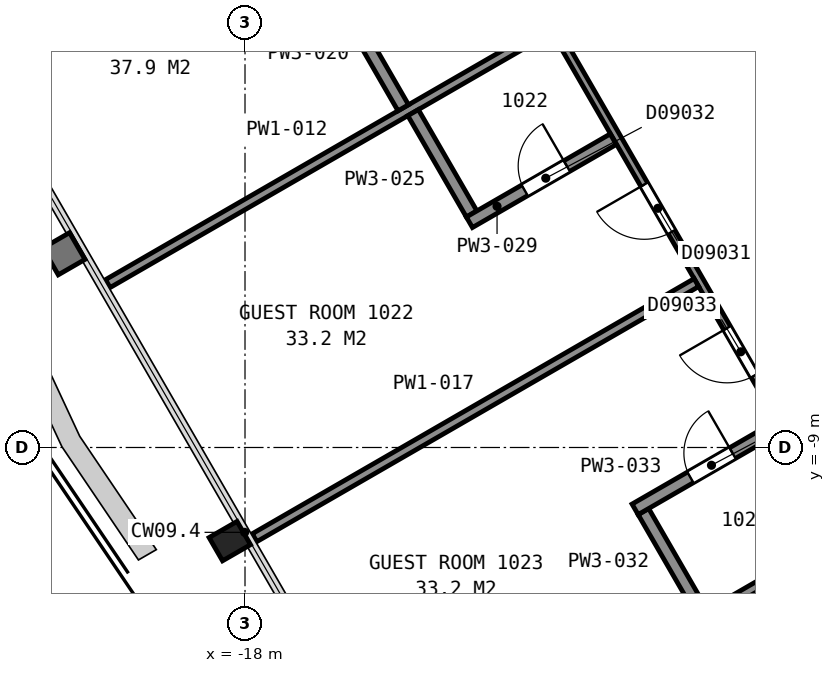
"""IFC4 building model, lengths in metres.
Left out: names, types, materials, properties, quantities, classifications, styles, units other than length and angle.
Written with IfcOpenShell. Run it as: python <this file> out.ifc"""

import sys

from ifc_helpers import new_model, si_unit, direction, frame, frame_2d, origin, origin_2d, place, context, subcontext, project, spatial, rectangle, i_section, extrude, element, fill, save


model = new_model("IFC4")
c1 = context("Model", 3, precision=1e-05, world=origin(), true_north=direction((0.0, 1.0)))
c2 = subcontext(c1, "Body", "Model", "MODEL_VIEW")
j1 = project(units=[si_unit("LENGTHUNIT", "METRE"), si_unit("PLANEANGLEUNIT", "RADIAN")], contexts=[c1])
p1 = place(None, origin())
s1 = spatial("IfcSite", under=j1, at=p1, CompositionType="ELEMENT")
p2 = place(p1, origin())
s2 = spatial("IfcBuilding", under=s1, at=p2, CompositionType="ELEMENT")
p3 = place(p2, frame((0.0, 0.0, 51.2)))
s3 = spatial("IfcBuildingStorey", under=s2, at=p3, CompositionType="ELEMENT", Elevation=51.2)
p4 = place(p3, frame((-18.25, -10.54, 0.0), z_axis=(0.0, 0.0, 1.0), x_axis=(-0.5, 0.866025403784, 0.0)))
e1 = element("IfcColumn", 1, at=p4, inside=s3, PredefinedType="COLUMN", context=c2, shape_type="SweptSolid", body=[
    extrude(i_section(OverallWidth=0.442, OverallDepth=0.531, WebThickness=0.066, FlangeThickness=0.106, FilletRadius=0.015, at=origin_2d()), origin(), (0.0, 0.0, 1.0), 3.6),
])
p5 = place(p3, frame((-13.664, 5.946, 0.0), z_axis=(0.0, 0.0, 1.0), x_axis=(0.499994327219, -0.866028678941, 0.0)))
e2 = element("IfcWall", 2, at=p5, inside=s3, PredefinedType="PARTITIONING", context=c2, shape_type="SweptSolid", body=[
    extrude(rectangle(XDim=23.968, YDim=0.2, at=frame_2d((11.984, 0.0))), origin(), (0.0, 0.0, 1.0), 3.35),
])
p6 = place(p3, frame((-20.256, -6.305, 0.0), z_axis=(0.0, 0.0, 1.0), x_axis=(0.866037818403, 0.499978496633, 0.0)))
e3 = element("IfcWall", 3, at=p6, inside=s3, PredefinedType="PARTITIONING", context=c2, shape_type="SweptSolid", body=[
    extrude(rectangle(XDim=8.391, YDim=0.15, at=frame_2d((4.196, 0.0))), origin(), (0.0, 0.0, 1.0), 2.613),
])
p7 = place(p3, frame((-3.766, -17.959, 0.0), z_axis=(0.0, 0.0, 1.0), x_axis=(-0.500002884005, 0.866023738697, 0.0)))
e4 = element("IfcWall", 4, at=p7, inside=s3, PredefinedType="PARTITIONING", context=c2, shape_type="SweptSolid", body=[
    extrude(rectangle(XDim=28.135, YDim=0.125, at=frame_2d((14.067, 0.0))), origin(), (0.0, 0.0, 1.0), 2.613),
])
p8 = place(p7, frame((25.422, 0.0, 0.0)))
e5 = element("IfcOpeningElement", 5, at=p8, cuts=e4, PredefinedType="OPENING", context=c2, shape_type="SweptSolid", body=[
    extrude(rectangle(XDim=1.0, YDim=2.1, at=frame_2d((0.5, 1.05))), frame((0.0, 0.073, 0.0), z_axis=(0.0, -1.0, 0.0), x_axis=(1.0, 0.0, 0.0)), (0.0, 0.0, 1.0), 0.145),
])
p9 = place(p7, frame((21.693, 0.0, 0.0)))
e6 = element("IfcOpeningElement", 6, at=p9, cuts=e4, PredefinedType="OPENING", context=c2, shape_type="SweptSolid", body=[
    extrude(rectangle(XDim=0.9, YDim=2.1, at=frame_2d((0.45, 1.05))), frame((0.0, 0.073, 0.0), z_axis=(0.0, -1.0, 0.0), x_axis=(1.0, 0.0, 0.0)), (0.0, 0.0, 1.0), 0.145),
])
p10 = place(p7, frame((14.438, 0.0, 0.0)))
e7 = element("IfcOpeningElement", 7, at=p10, cuts=e4, PredefinedType="OPENING", context=c2, shape_type="SweptSolid", body=[
    extrude(rectangle(XDim=0.9, YDim=2.1, at=frame_2d((0.45, 1.05))), frame((0.0, 0.073, 0.0), z_axis=(0.0, -1.0, 0.0), x_axis=(1.0, 0.0, 0.0)), (0.0, 0.0, 1.0), 0.145),
])
p11 = place(p7, frame((11.712, 0.0, 0.0)))
e8 = element("IfcOpeningElement", 8, at=p11, cuts=e4, PredefinedType="OPENING", context=c2, shape_type="SweptSolid", body=[
    extrude(rectangle(XDim=0.9, YDim=2.1, at=frame_2d((0.45, 1.05))), frame((0.0, 0.073, 0.0), z_axis=(0.0, -1.0, 0.0), x_axis=(1.0, 0.0, 0.0)), (0.0, 0.0, 1.0), 0.145),
])
p12 = place(p7, frame((4.787, 0.0, 0.0)))
e9 = element("IfcOpeningElement", 9, at=p12, cuts=e4, PredefinedType="OPENING", context=c2, shape_type="SweptSolid", body=[
    extrude(rectangle(XDim=0.9, YDim=2.1, at=frame_2d((0.45, 1.05))), frame((0.0, 0.073, 0.0), z_axis=(0.0, -1.0, 0.0), x_axis=(1.0, 0.0, 0.0)), (0.0, 0.0, 1.0), 0.145),
])
p13 = place(p7, frame((1.762, 0.0, 0.0)))
e10 = element("IfcOpeningElement", 10, at=p13, cuts=e4, PredefinedType="OPENING", context=c2, shape_type="SweptSolid", body=[
    extrude(rectangle(XDim=0.9, YDim=2.1, at=frame_2d((0.45, 1.05))), frame((0.0, 0.073, 0.0), z_axis=(0.0, -1.0, 0.0), x_axis=(1.0, 0.0, 0.0)), (0.0, 0.0, 1.0), 0.145),
])
p14 = place(p3, frame((-17.844, -10.484, 0.0), z_axis=(0.0, 0.0, 1.0), x_axis=(0.866037818403, 0.499978496633, 0.0)))
e11 = element("IfcWall", 11, at=p14, inside=s3, PredefinedType="PARTITIONING", context=c2, shape_type="SweptSolid", body=[
    extrude(rectangle(XDim=8.391, YDim=0.15, at=frame_2d((4.196, 0.0))), origin(), (0.0, 0.0, 1.0), 2.613),
])
p15 = place(p3, frame((-16.41, -1.659, 0.0), z_axis=(0.0, 0.0, 1.0), x_axis=(0.49983374806, -0.866121368112, 0.0)))
e12 = element("IfcWall", 12, at=p15, inside=s3, PredefinedType="PARTITIONING", context=c2, shape_type="SweptSolid", body=[
    extrude(rectangle(XDim=2.026, YDim=0.2, at=frame_2d((1.013, 0.0))), origin(), (0.0, 0.0, 1.0), 2.613),
])
p16 = place(p3, frame((-15.431, -14.663, 0.0), z_axis=(0.0, 0.0, 1.0), x_axis=(0.866027553047, 0.499996277349, 0.0)))
e13 = element("IfcWall", 13, at=p16, inside=s3, PredefinedType="PARTITIONING", context=c2, shape_type="SweptSolid", body=[
    extrude(rectangle(XDim=8.387, YDim=0.15, at=frame_2d((4.193, 0.0))), origin(), (0.0, 0.0, 1.0), 2.613),
])
p17 = place(p3, frame((-15.236, -3.493, 0.0), z_axis=(0.0, 0.0, 1.0), x_axis=(0.500190942922, -0.865915134767, 0.0)))
e14 = element("IfcWall", 14, at=p17, inside=s3, PredefinedType="PARTITIONING", context=c2, shape_type="SweptSolid", body=[
    extrude(rectangle(XDim=1.925, YDim=0.2, at=frame_2d((0.962, 0.0))), origin(), (0.0, 0.0, 1.0), 2.613),
])
p18 = place(p3, frame((-14.31, -5.296, 0.0), z_axis=(0.0, 0.0, 1.0), x_axis=(0.866012976267, 0.500021524473, 0.0)))
e15 = element("IfcWall", 15, at=p18, inside=s3, PredefinedType="PARTITIONING", context=c2, shape_type="SweptSolid", body=[
    extrude(rectangle(XDim=2.732, YDim=0.2, at=frame_2d((1.366, 0.0))), origin(), (0.0, 0.0, 1.0), 2.613),
])
p19 = place(p18, frame((1.05, 0.0, 0.0)))
e16 = element("IfcOpeningElement", 16, at=p19, cuts=e15, PredefinedType="OPENING", context=c2, shape_type="SweptSolid", body=[
    extrude(rectangle(XDim=0.8, YDim=2.1, at=frame_2d((0.4, 1.05))), frame((0.0, 0.11, 0.0), z_axis=(0.0, -1.0, 0.0), x_axis=(1.0, 0.0, 0.0)), (0.0, 0.0, 1.0), 0.22),
])
p20 = place(p3, frame((-11.448, -10.053, 0.0), z_axis=(0.0, 0.0, 1.0), x_axis=(0.500214044309, -0.865901789971, 0.0)))
e17 = element("IfcWall", 17, at=p20, inside=s3, PredefinedType="PARTITIONING", context=c2, shape_type="SweptSolid", body=[
    extrude(rectangle(XDim=1.92, YDim=0.2, at=frame_2d((0.96, 0.0))), origin(), (0.0, 0.0, 1.0), 2.613),
])
p21 = place(p3, frame((-9.218, -8.651, 0.0), z_axis=(0.0, 0.0, 1.0), x_axis=(-0.866063622699, -0.499933797055, 0.0)))
e18 = element("IfcWall", 18, at=p21, inside=s3, PredefinedType="PARTITIONING", context=c2, shape_type="SweptSolid", body=[
    extrude(rectangle(XDim=2.733, YDim=0.2, at=frame_2d((1.367, 0.0))), origin(), (0.0, 0.0, 1.0), 2.613),
])
p22 = place(p21, frame((0.883, 0.0, 0.0)))
e19 = element("IfcOpeningElement", 19, at=p22, cuts=e18, PredefinedType="OPENING", context=c2, shape_type="SweptSolid", body=[
    extrude(rectangle(XDim=0.8, YDim=2.1, at=frame_2d((0.4, 1.05))), frame((0.0, 0.11, 0.0), z_axis=(0.0, -1.0, 0.0), x_axis=(1.0, 0.0, 0.0)), (0.0, 0.0, 1.0), 0.22),
])
p23 = place(p10, origin())
e20 = element("IfcDoor", 20, at=p23, inside=s3, OperationType="SINGLE_SWING_RIGHT", PredefinedType="DOOR", context=c2, shape_type="SweptSolid", body=[
    extrude(rectangle(XDim=0.9, YDim=2.1, at=frame_2d((0.45, 1.05))), frame((0.0, 0.025, 0.0), z_axis=(0.0, -1.0, 0.0), x_axis=(1.0, 0.0, 0.0)), (0.0, 0.0, 1.0), 0.05),
])
fill(e7, e20)
p24 = place(p11, origin())
e21 = element("IfcDoor", 21, at=p24, inside=s3, OperationType="SINGLE_SWING_RIGHT", PredefinedType="DOOR", context=c2, shape_type="SweptSolid", body=[
    extrude(rectangle(XDim=0.9, YDim=2.1, at=frame_2d((0.45, 1.05))), frame((0.0, 0.025, 0.0), z_axis=(0.0, -1.0, 0.0), x_axis=(1.0, 0.0, 0.0)), (0.0, 0.0, 1.0), 0.05),
])
fill(e8, e21)
p25 = place(p19, origin())
e22 = element("IfcDoor", 22, at=p25, inside=s3, OperationType="SINGLE_SWING_RIGHT", PredefinedType="DOOR", context=c2, shape_type="SweptSolid", body=[
    extrude(rectangle(XDim=0.8, YDim=2.1, at=frame_2d((0.4, 1.05))), frame((0.0, 0.025, 0.0), z_axis=(0.0, -1.0, 0.0), x_axis=(1.0, 0.0, 0.0)), (0.0, 0.0, 1.0), 0.05),
])
fill(e16, e22)
p26 = place(p22, origin())
e23 = element("IfcDoor", 23, at=p26, inside=s3, OperationType="SINGLE_SWING_LEFT", PredefinedType="DOOR", context=c2, shape_type="SweptSolid", body=[
    extrude(rectangle(XDim=0.8, YDim=2.1, at=frame_2d((0.4, 1.05))), frame((0.0, 0.025, 0.0), z_axis=(0.0, -1.0, 0.0), x_axis=(1.0, 0.0, 0.0)), (0.0, 0.0, 1.0), 0.05),
])
fill(e19, e23)
save(model, sys.argv[1])
